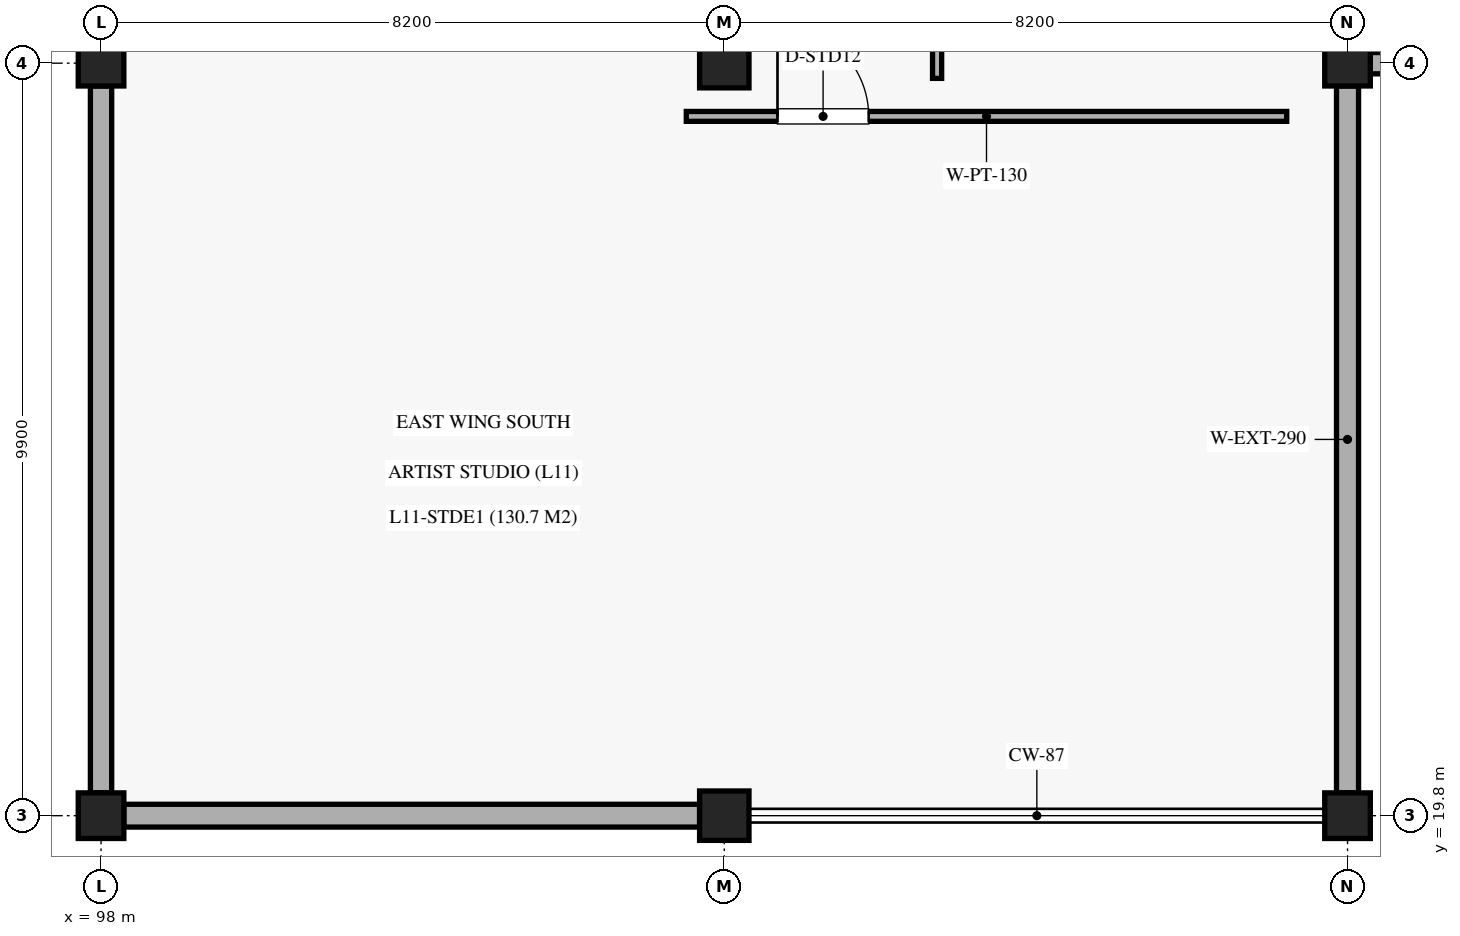
"""IFC4 building model, lengths in metres.
Left out: names, types, materials, properties, quantities, classifications, styles, units other than length and angle.
Written with IfcOpenShell. Run it as: python <this file> out.ifc"""

import sys

from ifc_helpers import new_model, si_unit, direction, frame, frame_2d, origin, origin_2d, place, context, subcontext, project, spatial, rectangle, extrude, element, fill, save


model = new_model("IFC4")
c1 = context("Model", 3, precision=1e-05, world=origin(), true_north=direction((0.0, 1.0)))
c2 = subcontext(c1, "Body", "Model", "MODEL_VIEW")
j1 = project(units=[si_unit("LENGTHUNIT", "METRE"), si_unit("PLANEANGLEUNIT", "RADIAN")], contexts=[c1])
p1 = place(None, origin())
s1 = spatial("IfcSite", under=j1, at=p1, CompositionType="ELEMENT")
p2 = place(p1, origin())
s2 = spatial("IfcBuilding", under=s1, at=p2, CompositionType="ELEMENT")
p3 = place(p2, frame((0.0, 0.0, 57.12)))
s3 = spatial("IfcBuildingStorey", under=s2, at=p3, CompositionType="ELEMENT", Elevation=57.12)
for number, where, z_axis, x_axis in (
    (1, (98.0, 19.8, 0.0), (0.0, 0.0, 1.0), (1.0, 0.0, 0.0)),
    (2, (98.0, 29.7, 0.0), (0.0, 0.0, 1.0), (1.0, 0.0, 0.0)),
):
    element("IfcColumn", number, at=place(p3, frame(where, z_axis=z_axis, x_axis=x_axis)), inside=s3, PredefinedType="COLUMN", context=c2, shape_type="SweptSolid", body=[
        extrude(rectangle(XDim=0.6, YDim=0.6, at=origin_2d()), origin(), (0.0, 0.0, 1.0), 5.1),
    ])
for number, where, z_axis, x_axis in (
    (3, (106.2, 19.8, 0.0), (0.0, 0.0, 1.0), (1.0, 0.0, 0.0)),
    (4, (106.2, 29.7, 0.0), (0.0, 0.0, 1.0), (1.0, 0.0, 0.0)),
):
    element("IfcColumn", number, at=place(p3, frame(where, z_axis=z_axis, x_axis=x_axis)), inside=s3, PredefinedType="COLUMN", context=c2, shape_type="SweptSolid", body=[
        extrude(rectangle(XDim=0.65, YDim=0.65, at=origin_2d()), origin(), (0.0, 0.0, 1.0), 5.1),
    ])
for number, where, z_axis, x_axis in (
    (5, (114.4, 19.8, 0.0), (0.0, 0.0, 1.0), (1.0, 0.0, 0.0)),
    (6, (114.4, 29.7, 0.0), (0.0, 0.0, 1.0), (1.0, 0.0, 0.0)),
):
    element("IfcColumn", number, at=place(p3, frame(where, z_axis=z_axis, x_axis=x_axis)), inside=s3, PredefinedType="COLUMN", context=c2, shape_type="SweptSolid", body=[
        extrude(rectangle(XDim=0.6, YDim=0.6, at=origin_2d()), origin(), (0.0, 0.0, 1.0), 5.1),
    ])
p4 = place(p3, frame((98.0, 20.1, 0.0), z_axis=(0.0, 0.0, 1.0), x_axis=(0.0, 1.0, 0.0)))
e7 = element("IfcWall", 7, at=p4, inside=s3, PredefinedType="SOLIDWALL", context=c2, shape_type="SweptSolid", body=[
    extrude(rectangle(XDim=9.3, YDim=0.28, at=frame_2d((4.65, 0.0))), origin(), (0.0, 0.0, 1.0), 4.12),
])
p5 = place(p3, frame((114.4, 20.1, 0.0), z_axis=(0.0, 0.0, 1.0), x_axis=(0.0, 1.0, 0.0)))
e8 = element("IfcWall", 8, at=p5, inside=s3, PredefinedType="SOLIDWALL", context=c2, shape_type="SweptSolid", body=[
    extrude(rectangle(XDim=9.3, YDim=0.29, at=frame_2d((4.65, 0.0))), origin(), (0.0, 0.0, 1.0), 4.12),
])
p6 = place(p3, frame((98.3, 19.8, 0.0), z_axis=(0.0, 0.0, 1.0), x_axis=(1.0, 0.0, 0.0)))
e9 = element("IfcWall", 9, at=p6, inside=s3, PredefinedType="SOLIDWALL", context=c2, shape_type="SweptSolid", body=[
    extrude(rectangle(XDim=7.575, YDim=0.3, at=frame_2d((3.788, 0.0))), origin(), (0.0, 0.0, 1.0), 4.12),
])
p7 = place(p3, frame((114.7, 29.7, 0.0), z_axis=(0.0, 0.0, 1.0), x_axis=(1.0, 0.0, 0.0)))
e10 = element("IfcWall", 10, at=p7, inside=s3, PredefinedType="SOLIDWALL", context=c2, shape_type="SweptSolid", body=[
    extrude(rectangle(XDim=1.6, YDim=0.28, at=frame_2d((0.8, 0.0))), origin(), (0.0, 0.0, 1.0), 4.12),
])
p8 = place(p3, frame((105.7, 29.0, 0.0), z_axis=(0.0, 0.0, 1.0), x_axis=(1.0, 0.0, 0.0)))
e11 = element("IfcWall", 11, at=p8, inside=s3, PredefinedType="PARTITIONING", context=c2, shape_type="SweptSolid", body=[
    extrude(rectangle(XDim=7.9, YDim=0.13, at=frame_2d((3.95, 0.0))), origin(), (0.0, 0.0, 1.0), 3.99),
])
p9 = place(p8, frame((1.2, 0.0, 0.0)))
e12 = element("IfcOpeningElement", 12, at=p9, cuts=e11, PredefinedType="OPENING", context=c2, shape_type="SweptSolid", body=[
    extrude(rectangle(XDim=1.2, YDim=2.25, at=frame_2d((0.6, 1.125))), frame((0.0, 0.075, 0.0), z_axis=(0.0, -1.0, 0.0), x_axis=(1.0, 0.0, 0.0)), (0.0, 0.0, 1.0), 0.15),
])
p10 = place(p3, frame((109.0, 29.5, 0.0), z_axis=(0.0, 0.0, 1.0), x_axis=(0.0, 1.0, 0.0)))
e13 = element("IfcWall", 13, at=p10, inside=s3, PredefinedType="PARTITIONING", context=c2, shape_type="SweptSolid", body=[
    extrude(rectangle(XDim=38.0, YDim=0.12, at=frame_2d((19.0, 0.0))), origin(), (0.0, 0.0, 1.0), 3.99),
])
p11 = place(p10, frame((8.0, 0.0, 0.0)))
e14 = element("IfcOpeningElement", 14, at=p11, cuts=e13, PredefinedType="OPENING", context=c2, shape_type="SweptSolid", body=[
    extrude(rectangle(XDim=1.2, YDim=2.25, at=frame_2d((0.6, 1.125))), frame((0.0, 0.07, 0.0), z_axis=(0.0, -1.0, 0.0), x_axis=(1.0, 0.0, 0.0)), (0.0, 0.0, 1.0), 0.14),
])
p12 = place(p9, origin())
e15 = element("IfcDoor", 15, at=p12, inside=s3, OperationType="SINGLE_SWING_LEFT", PredefinedType="DOOR", context=c2, shape_type="SweptSolid", body=[
    extrude(rectangle(XDim=1.2, YDim=2.25, at=frame_2d((0.6, 1.125))), frame((0.0, 0.025, 0.0), z_axis=(0.0, -1.0, 0.0), x_axis=(1.0, 0.0, 0.0)), (0.0, 0.0, 1.0), 0.05),
])
fill(e12, e15)
save(model, sys.argv[1])
